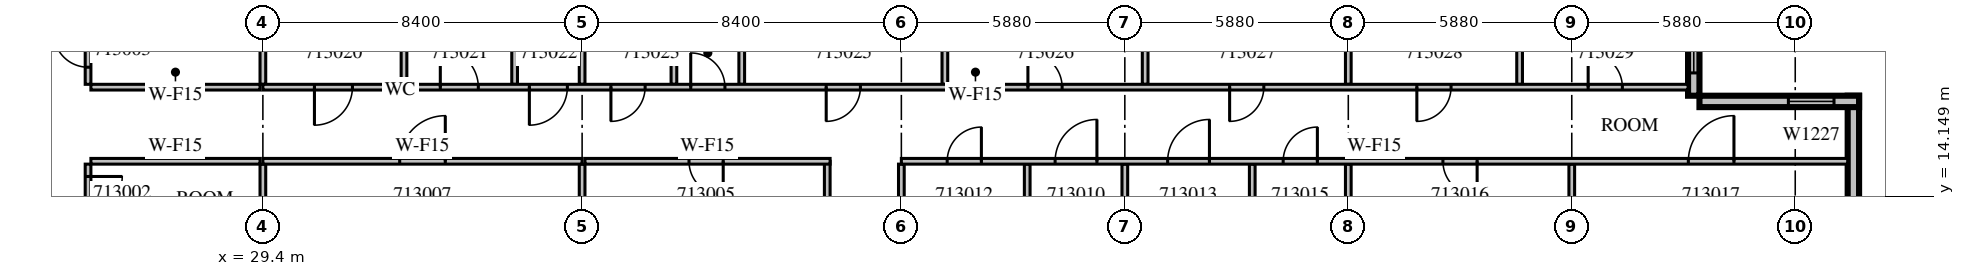
"""IFC4 building model, lengths in metres.
Left out: names, types, materials, properties, quantities, classifications, styles, units other than length and angle.
Written with IfcOpenShell. Run it as: python <this file> out.ifc"""

import sys

from ifc_helpers import new_model, si_unit, direction, frame, frame_2d, origin, place, context, subcontext, project, spatial, rectangle, extrude, source, transform, mapped, element, fill, save


model = new_model("IFC4")
c1 = context("Model", 3, precision=1e-05, world=origin(), true_north=direction((0.0, 1.0)))
c2 = subcontext(c1, "Body", "Model", "MODEL_VIEW")
j1 = project(units=[si_unit("LENGTHUNIT", "METRE"), si_unit("PLANEANGLEUNIT", "RADIAN")], contexts=[c1])
p1 = place(None, origin())
s1 = spatial("IfcSite", under=j1, at=p1, CompositionType="ELEMENT")
p2 = place(p1, origin())
s2 = spatial("IfcBuilding", under=s1, at=p2, CompositionType="ELEMENT")
p3 = place(p2, frame((0.0, 0.0, 65.7)))
s3 = spatial("IfcBuildingStorey", under=s2, at=p3, CompositionType="ELEMENT", Elevation=65.7)
m1 = source(origin(), c2, "Body", "SweptSolid", [
    extrude(rectangle(XDim=6.3, YDim=0.3, at=frame_2d((3.15, 0.0))), origin(), (0.0, 0.0, 1.0), 3.8),
])
p4 = place(p3, frame((71.25, 10.5, 0.0), z_axis=(0.0, 0.0, 1.0), x_axis=(0.0, 1.0, 0.0)))
e1 = element("IfcWall", 1, at=p4, inside=s3, PredefinedType="STANDARD", context=c2, shape_type="MappedRepresentation", body=[
    mapped(m1, transform((0.0, 0.0, 0.0), scale=1.0)),
])
m2 = source(origin(), c2, "Body", "SweptSolid", [
    extrude(rectangle(XDim=1.2, YDim=2.7, at=frame_2d((0.6, 1.35))), frame((0.0, 0.16, 0.0), z_axis=(0.0, -1.0, 0.0), x_axis=(1.0, 0.0, 0.0)), (0.0, 0.0, 1.0), 0.32),
])
p5 = place(p4, frame((1.062, 0.0, 0.6)))
e2 = element("IfcOpeningElement", 2, at=p5, cuts=e1, PredefinedType="OPENING", context=c2, shape_type="MappedRepresentation", body=[
    mapped(m2, transform((0.0, 0.0, 0.0), scale=1.0)),
])
m3 = source(origin(), c2, "Body", "SweptSolid", [
    extrude(rectangle(XDim=4.2, YDim=0.3, at=frame_2d((2.1, 0.0))), origin(), (0.0, 0.0, 1.0), 3.8),
])
p6 = place(p3, frame((71.4, 16.65, 0.0), z_axis=(0.0, 0.0, 1.0), x_axis=(-1.0, 0.0, 0.0)))
e3 = element("IfcWall", 3, at=p6, inside=s3, PredefinedType="STANDARD", context=c2, shape_type="MappedRepresentation", body=[
    mapped(m3, transform((0.0, 0.0, 0.0), scale=1.0)),
])
p7 = place(p6, frame((0.66, 0.0, 0.6)))
e4 = element("IfcOpeningElement", 4, at=p7, cuts=e3, PredefinedType="OPENING", context=c2, shape_type="MappedRepresentation", body=[
    mapped(m2, transform((0.0, 0.0, 0.0), scale=1.0)),
])
p8 = place(p3, frame((67.05, 16.8, 0.0), z_axis=(0.0, 0.0, 1.0), x_axis=(0.0, 1.0, 0.0)))
e5 = element("IfcWall", 5, at=p8, inside=s3, PredefinedType="STANDARD", context=c2, shape_type="MappedRepresentation", body=[
    mapped(m3, transform((0.0, 0.0, 0.0), scale=1.0)),
])
m4 = source(origin(), c2, "Body", "SweptSolid", [
    extrude(rectangle(XDim=3.0, YDim=2.7, at=frame_2d((1.5, 1.35))), frame((0.0, 0.16, 0.0), z_axis=(0.0, -1.0, 0.0), x_axis=(1.0, 0.0, 0.0)), (0.0, 0.0, 1.0), 0.32),
])
p9 = place(p8, frame((0.6, 0.0, 0.6)))
e6 = element("IfcOpeningElement", 6, at=p9, cuts=e5, PredefinedType="OPENING", context=c2, shape_type="MappedRepresentation", body=[
    mapped(m4, transform((0.0, 0.0, 0.0), scale=1.0)),
])
m5 = source(origin(), c2, "Body", "SweptSolid", [
    extrude(rectangle(XDim=11.925, YDim=0.15, at=frame_2d((5.963, 0.0))), origin(), (0.0, 0.0, 1.0), 3.8),
])
p10 = place(p3, frame((24.8, 15.0, 0.0), z_axis=(0.0, 0.0, 1.0), x_axis=(0.0, -1.0, 0.0)))
e7 = element("IfcWall", 7, at=p10, inside=s3, PredefinedType="PARTITIONING", context=c2, shape_type="MappedRepresentation", body=[
    mapped(m5, transform((0.0, 0.0, 0.0), scale=1.0)),
])
m6 = source(origin(), c2, "Body", "SweptSolid", [
    extrude(rectangle(XDim=0.9, YDim=2.1, at=frame_2d((0.45, 1.05))), frame((0.0, 0.085, 0.0), z_axis=(0.0, -1.0, 0.0), x_axis=(1.0, 0.0, 0.0)), (0.0, 0.0, 1.0), 0.17),
])
p11 = place(p10, frame((7.162, 0.0, 0.0)))
e8 = element("IfcOpeningElement", 8, at=p11, cuts=e7, PredefinedType="OPENING", context=c2, shape_type="MappedRepresentation", body=[
    mapped(m6, transform((0.0, 0.0, 0.0), scale=1.0)),
])
p12 = place(p10, frame((0.325, 0.0, 0.0)))
e9 = element("IfcOpeningElement", 9, at=p12, cuts=e7, PredefinedType="OPENING", context=c2, shape_type="MappedRepresentation", body=[
    mapped(m6, transform((0.0, 0.0, 0.0), scale=1.0)),
])
m7 = source(origin(), c2, "Body", "SweptSolid", [
    extrude(rectangle(XDim=3.6, YDim=0.15, at=frame_2d((1.8, 0.0))), origin(), (0.0, 0.0, 1.0), 3.8),
])
p13 = place(p3, frame((24.8, 20.7, 0.0), z_axis=(0.0, 0.0, 1.0), x_axis=(0.0, -1.0, 0.0)))
e10 = element("IfcWall", 10, at=p13, inside=s3, PredefinedType="PARTITIONING", context=c2, shape_type="MappedRepresentation", body=[
    mapped(m7, transform((0.0, 0.0, 0.0), scale=1.0)),
])
p14 = place(p13, frame((2.25, 0.0, 0.0)))
e11 = element("IfcOpeningElement", 11, at=p14, cuts=e10, PredefinedType="OPENING", context=c2, shape_type="MappedRepresentation", body=[
    mapped(m6, transform((0.0, 0.0, 0.0), scale=1.0)),
])
m8 = source(origin(), c2, "Body", "SweptSolid", [
    extrude(rectangle(XDim=4.45, YDim=0.15, at=frame_2d((2.225, 0.0))), origin(), (0.0, 0.0, 1.0), 3.8),
])
for number, where, z_axis, x_axis in (
    (12, (29.325, 15.075, 0.0), (0.0, 0.0, 1.0), (-1.0, 0.0, 0.0)),
    (13, (24.875, 17.025, 0.0), (0.0, 0.0, 1.0), (1.0, 0.0, 0.0)),
):
    element("IfcWall", number, at=place(p3, frame(where, z_axis=z_axis, x_axis=x_axis)), inside=s3, PredefinedType="PARTITIONING", context=c2, shape_type="MappedRepresentation", body=[
        mapped(m8, transform((0.0, 0.0, 0.0), scale=1.0)),
    ])
m9 = source(origin(), c2, "Body", "SweptSolid", [
    extrude(rectangle(XDim=3.901, YDim=0.15, at=frame_2d((1.95, 0.0))), origin(), (0.0, 0.0, 1.0), 3.8),
])
p15 = place(p3, frame((29.4, 11.099, 0.0), z_axis=(0.0, 0.0, 1.0), x_axis=(0.0, 1.0, 0.0)))
e14 = element("IfcWall", 14, at=p15, inside=s3, PredefinedType="PARTITIONING", context=c2, shape_type="MappedRepresentation", body=[
    mapped(m9, transform((0.0, 0.0, 0.0), scale=1.0)),
])
m10 = source(origin(), c2, "Body", "SweptSolid", [
    extrude(rectangle(XDim=2.701, YDim=0.15, at=frame_2d((1.351, 0.0))), origin(), (0.0, 0.0, 1.0), 3.8),
])
p16 = place(p3, frame((29.4, 17.1, 0.0), z_axis=(0.0, 0.0, 1.0), x_axis=(0.0, 1.0, 0.0)))
e15 = element("IfcWall", 15, at=p16, inside=s3, PredefinedType="PARTITIONING", context=c2, shape_type="MappedRepresentation", body=[
    mapped(m10, transform((0.0, 0.0, 0.0), scale=1.0)),
])
p17 = place(p3, frame((44.25, 12.3, 0.0), z_axis=(0.0, 0.0, 1.0), x_axis=(0.0, 1.0, 0.0)))
e16 = element("IfcWall", 16, at=p17, inside=s3, PredefinedType="PARTITIONING", context=c2, shape_type="SweptSolid", body=[
    extrude(rectangle(XDim=2.775, YDim=0.15, at=frame_2d((1.387, 0.0))), origin(), (0.0, 0.0, 1.0), 3.8),
])
m11 = source(origin(), c2, "Body", "SweptSolid", [
    extrude(rectangle(XDim=6.45, YDim=0.15, at=frame_2d((3.225, 0.0))), origin(), (0.0, 0.0, 1.0), 3.8),
])
p18 = place(p3, frame((44.325, 15.075, 0.0), z_axis=(0.0, 0.0, 1.0), x_axis=(-1.0, 0.0, 0.0)))
e17 = element("IfcWall", 17, at=p18, inside=s3, PredefinedType="PARTITIONING", context=c2, shape_type="MappedRepresentation", body=[
    mapped(m11, transform((0.0, 0.0, 0.0), scale=1.0)),
])
p19 = place(p18, frame((2.812, 0.0, 0.0)))
e18 = element("IfcOpeningElement", 18, at=p19, cuts=e17, PredefinedType="OPENING", context=c2, shape_type="MappedRepresentation", body=[
    mapped(m6, transform((0.0, 0.0, 0.0), scale=1.0)),
])
m12 = source(origin(), c2, "Body", "SweptSolid", [
    extrude(rectangle(XDim=3.75, YDim=0.15, at=frame_2d((1.875, 0.0))), origin(), (0.0, 0.0, 1.0), 3.8),
])
for number, where, z_axis, x_axis in (
    (19, (37.8, 11.25, 0.0), (0.0, 0.0, 1.0), (0.0, 1.0, 0.0)),
    (20, (49.512, 11.25, 0.0), (0.0, 0.0, 1.0), (0.0, 1.0, 0.0)),
    (21, (55.433, 11.25, 0.0), (0.0, 0.0, 1.0), (0.0, 1.0, 0.0)),
    (22, (57.96, 11.25, 0.0), (0.0, 0.0, 1.0), (0.0, 1.0, 0.0)),
    (23, (46.2, 11.25, 0.0), (0.0, 0.0, 1.0), (0.0, 1.0, 0.0)),
    (24, (52.08, 11.25, 0.0), (0.0, 0.0, 1.0), (0.0, 1.0, 0.0)),
    (25, (63.84, 11.25, 0.0), (0.0, 0.0, 1.0), (0.0, 1.0, 0.0)),
):
    element("IfcWall", number, at=place(p3, frame(where, z_axis=z_axis, x_axis=x_axis)), inside=s3, PredefinedType="PARTITIONING", context=c2, shape_type="MappedRepresentation", body=[
        mapped(m12, transform((0.0, 0.0, 0.0), scale=1.0)),
    ])
for number, where, z_axis, x_axis in (
    (26, (33.113, 20.7, 0.0), (0.0, 0.0, 1.0), (0.0, -1.0, 0.0)),
    (27, (36.024, 20.7, 0.0), (0.0, 0.0, 1.0), (0.0, -1.0, 0.0)),
    (28, (40.216, 20.7, 0.0), (0.0, 0.0, 1.0), (0.0, -1.0, 0.0)),
    (29, (47.345, 20.7, 0.0), (0.0, 0.0, 1.0), (0.0, -1.0, 0.0)),
):
    element("IfcWall", number, at=place(p3, frame(where, z_axis=z_axis, x_axis=x_axis)), inside=s3, PredefinedType="PARTITIONING", context=c2, shape_type="MappedRepresentation", body=[
        mapped(m7, transform((0.0, 0.0, 0.0), scale=1.0)),
    ])
p20 = place(p3, frame((52.615, 19.801, 0.0), z_axis=(0.0, 0.0, 1.0), x_axis=(0.0, -1.0, 0.0)))
e30 = element("IfcWall", 30, at=p20, inside=s3, PredefinedType="PARTITIONING", context=c2, shape_type="MappedRepresentation", body=[
    mapped(m10, transform((0.0, 0.0, 0.0), scale=1.0)),
])
p21 = place(p3, frame((62.468, 20.7, 0.0), z_axis=(0.0, 0.0, 1.0), x_axis=(0.0, -1.0, 0.0)))
e31 = element("IfcWall", 31, at=p21, inside=s3, PredefinedType="PARTITIONING", context=c2, shape_type="MappedRepresentation", body=[
    mapped(m7, transform((0.0, 0.0, 0.0), scale=1.0)),
])
p22 = place(p3, frame((37.8, 17.1, 0.0), z_axis=(0.0, 0.0, 1.0), x_axis=(0.0, 1.0, 0.0)))
e32 = element("IfcWall", 32, at=p22, inside=s3, PredefinedType="PARTITIONING", context=c2, shape_type="MappedRepresentation", body=[
    mapped(m10, transform((0.0, 0.0, 0.0), scale=1.0)),
])
p23 = place(p3, frame((42.0, 17.1, 0.0), z_axis=(0.0, 0.0, 1.0), x_axis=(0.0, 1.0, 0.0)))
e33 = element("IfcWall", 33, at=p23, inside=s3, PredefinedType="PARTITIONING", context=c2, shape_type="MappedRepresentation", body=[
    mapped(m7, transform((0.0, 0.0, 0.0), scale=1.0)),
])
p24 = place(p3, frame((57.96, 17.1, 0.0), z_axis=(0.0, 0.0, 1.0), x_axis=(0.0, 1.0, 0.0)))
e34 = element("IfcWall", 34, at=p24, inside=s3, PredefinedType="PARTITIONING", context=c2, shape_type="MappedRepresentation", body=[
    mapped(m10, transform((0.0, 0.0, 0.0), scale=1.0)),
])
m13 = source(origin(), c2, "Body", "SweptSolid", [
    extrude(rectangle(XDim=8.4, YDim=0.15, at=frame_2d((4.2, 0.0))), origin(), (0.0, 0.0, 1.0), 3.8),
])
p25 = place(p3, frame((37.8, 15.075, 0.0), z_axis=(0.0, 0.0, 1.0), x_axis=(-1.0, 0.0, 0.0)))
e35 = element("IfcWall", 35, at=p25, inside=s3, PredefinedType="PARTITIONING", context=c2, shape_type="MappedRepresentation", body=[
    mapped(m13, transform((0.0, 0.0, 0.0), scale=1.0)),
])
m14 = source(origin(), c2, "Body", "SweptSolid", [
    extrude(rectangle(XDim=1.2, YDim=2.1, at=frame_2d((0.6, 1.05))), frame((0.0, 0.085, 0.0), z_axis=(0.0, -1.0, 0.0), x_axis=(1.0, 0.0, 0.0)), (0.0, 0.0, 1.0), 0.17),
])
p26 = place(p25, frame((3.6, 0.0, 0.0)))
e36 = element("IfcOpeningElement", 36, at=p26, cuts=e35, PredefinedType="OPENING", context=c2, shape_type="MappedRepresentation", body=[
    mapped(m14, transform((0.0, 0.0, 0.0), scale=1.0)),
])
m15 = source(origin(), c2, "Body", "SweptSolid", [
    extrude(rectangle(XDim=24.9, YDim=0.15, at=frame_2d((12.45, 0.0))), origin(), (0.0, 0.0, 1.0), 3.8),
])
p27 = place(p3, frame((71.1, 15.075, 0.0), z_axis=(0.0, 0.0, 1.0), x_axis=(-1.0, 0.0, 0.0)))
e37 = element("IfcWall", 37, at=p27, inside=s3, PredefinedType="PARTITIONING", context=c2, shape_type="MappedRepresentation", body=[
    mapped(m15, transform((0.0, 0.0, 0.0), scale=1.0)),
])
m16 = source(origin(), c2, "Body", "SweptSolid", [
    extrude(rectangle(XDim=1.1, YDim=2.1, at=frame_2d((0.55, 1.05))), frame((0.0, 0.085, 0.0), z_axis=(0.0, -1.0, 0.0), x_axis=(1.0, 0.0, 0.0)), (0.0, 0.0, 1.0), 0.17),
])
p28 = place(p27, frame((19.754, 0.0, 0.0)))
e38 = element("IfcOpeningElement", 38, at=p28, cuts=e37, PredefinedType="OPENING", context=c2, shape_type="MappedRepresentation", body=[
    mapped(m16, transform((0.0, 0.0, 0.0), scale=1.0)),
])
p29 = place(p27, frame((22.794, 0.0, 0.0)))
e39 = element("IfcOpeningElement", 39, at=p29, cuts=e37, PredefinedType="OPENING", context=c2, shape_type="MappedRepresentation", body=[
    mapped(m6, transform((0.0, 0.0, 0.0), scale=1.0)),
])
p30 = place(p27, frame((16.794, 0.0, 0.0)))
e40 = element("IfcOpeningElement", 40, at=p30, cuts=e37, PredefinedType="OPENING", context=c2, shape_type="MappedRepresentation", body=[
    mapped(m16, transform((0.0, 0.0, 0.0), scale=1.0)),
])
p31 = place(p27, frame((13.954, 0.0, 0.0)))
e41 = element("IfcOpeningElement", 41, at=p31, cuts=e37, PredefinedType="OPENING", context=c2, shape_type="MappedRepresentation", body=[
    mapped(m6, transform((0.0, 0.0, 0.0), scale=1.0)),
])
p32 = place(p27, frame((9.75, 0.0, 0.0)))
e42 = element("IfcOpeningElement", 42, at=p32, cuts=e37, PredefinedType="OPENING", context=c2, shape_type="MappedRepresentation", body=[
    mapped(m6, transform((0.0, 0.0, 0.0), scale=1.0)),
])
p33 = place(p27, frame((2.993, 0.0, 0.0)))
e43 = element("IfcOpeningElement", 43, at=p33, cuts=e37, PredefinedType="OPENING", context=c2, shape_type="MappedRepresentation", body=[
    mapped(m14, transform((0.0, 0.0, 0.0), scale=1.0)),
])
m17 = source(origin(), c2, "Body", "SweptSolid", [
    extrude(rectangle(XDim=37.5, YDim=0.15, at=frame_2d((18.75, 0.0))), origin(), (0.0, 0.0, 1.0), 3.8),
])
p34 = place(p3, frame((29.4, 17.025, 0.0), z_axis=(0.0, 0.0, 1.0), x_axis=(1.0, 0.0, 0.0)))
e44 = element("IfcWall", 44, at=p34, inside=s3, PredefinedType="PARTITIONING", context=c2, shape_type="MappedRepresentation", body=[
    mapped(m17, transform((0.0, 0.0, 0.0), scale=1.0)),
])
m18 = source(origin(), c2, "Body", "SweptSolid", [
    extrude(rectangle(XDim=1.0, YDim=2.1, at=frame_2d((0.5, 1.05))), frame((0.0, 0.085, 0.0), z_axis=(0.0, -1.0, 0.0), x_axis=(1.0, 0.0, 0.0)), (0.0, 0.0, 1.0), 0.17),
])
p35 = place(p34, frame((1.357, 0.0, 0.0)))
e45 = element("IfcOpeningElement", 45, at=p35, cuts=e44, PredefinedType="OPENING", context=c2, shape_type="MappedRepresentation", body=[
    mapped(m18, transform((0.0, 0.0, 0.0), scale=1.0)),
])
p36 = place(p34, frame((4.669, 0.0, 0.0)))
e46 = element("IfcOpeningElement", 46, at=p36, cuts=e44, PredefinedType="OPENING", context=c2, shape_type="MappedRepresentation", body=[
    mapped(m18, transform((0.0, 0.0, 0.0), scale=1.0)),
])
p37 = place(p34, frame((7.012, 0.0, 0.0)))
e47 = element("IfcOpeningElement", 47, at=p37, cuts=e44, PredefinedType="OPENING", context=c2, shape_type="MappedRepresentation", body=[
    mapped(m18, transform((0.0, 0.0, 0.0), scale=1.0)),
])
p38 = place(p34, frame((9.158, 0.0, 0.0)))
e48 = element("IfcOpeningElement", 48, at=p38, cuts=e44, PredefinedType="OPENING", context=c2, shape_type="MappedRepresentation", body=[
    mapped(m6, transform((0.0, 0.0, 0.0), scale=1.0)),
])
p39 = place(p34, frame((11.258, 0.0, 0.0)))
e49 = element("IfcOpeningElement", 49, at=p39, cuts=e44, PredefinedType="OPENING", context=c2, shape_type="MappedRepresentation", body=[
    mapped(m6, transform((0.0, 0.0, 0.0), scale=1.0)),
])
p40 = place(p34, frame((14.822, 0.0, 0.0)))
e50 = element("IfcOpeningElement", 50, at=p40, cuts=e44, PredefinedType="OPENING", context=c2, shape_type="MappedRepresentation", body=[
    mapped(m6, transform((0.0, 0.0, 0.0), scale=1.0)),
])
p41 = place(p34, frame((20.13, 0.0, 0.0)))
e51 = element("IfcOpeningElement", 51, at=p41, cuts=e44, PredefinedType="OPENING", context=c2, shape_type="MappedRepresentation", body=[
    mapped(m6, transform((0.0, 0.0, 0.0), scale=1.0)),
])
p42 = place(p34, frame((25.438, 0.0, 0.0)))
e52 = element("IfcOpeningElement", 52, at=p42, cuts=e44, PredefinedType="OPENING", context=c2, shape_type="MappedRepresentation", body=[
    mapped(m6, transform((0.0, 0.0, 0.0), scale=1.0)),
])
p43 = place(p34, frame((30.364, 0.0, 0.0)))
e53 = element("IfcOpeningElement", 53, at=p43, cuts=e44, PredefinedType="OPENING", context=c2, shape_type="MappedRepresentation", body=[
    mapped(m6, transform((0.0, 0.0, 0.0), scale=1.0)),
])
p44 = place(p34, frame((34.871, 0.0, 0.0)))
e54 = element("IfcOpeningElement", 54, at=p44, cuts=e44, PredefinedType="OPENING", context=c2, shape_type="MappedRepresentation", body=[
    mapped(m6, transform((0.0, 0.0, 0.0), scale=1.0)),
])
m19 = source(origin(), c2, "Body", "SweptSolid", [
    extrude(rectangle(XDim=1.2, YDim=2.7, at=frame_2d((0.6, 1.35))), frame((0.0, 0.03, 0.0), z_axis=(0.0, -1.0, 0.0), x_axis=(1.0, 0.0, 0.0)), (0.0, 0.0, 1.0), 0.06),
])
p45 = place(p7, origin())
e55 = element("IfcWindow", 55, at=p45, inside=s3, PartitioningType="SINGLE_PANEL", PredefinedType="WINDOW", context=c2, shape_type="MappedRepresentation", body=[
    mapped(m19, transform((0.0, 0.0, 0.0), scale=1.0)),
])
fill(e4, e55)
m20 = source(origin(), c2, "Body", "SweptSolid", [
    extrude(rectangle(XDim=3.0, YDim=2.7, at=frame_2d((1.5, 1.35))), frame((0.0, 0.03, 0.0), z_axis=(0.0, -1.0, 0.0), x_axis=(1.0, 0.0, 0.0)), (0.0, 0.0, 1.0), 0.06),
])
p46 = place(p9, origin())
e56 = element("IfcWindow", 56, at=p46, inside=s3, PartitioningType="SINGLE_PANEL", PredefinedType="WINDOW", context=c2, shape_type="MappedRepresentation", body=[
    mapped(m20, transform((0.0, 0.0, 0.0), scale=1.0)),
])
fill(e6, e56)
m21 = source(origin(), c2, "Body", "SweptSolid", [
    extrude(rectangle(XDim=0.9, YDim=2.1, at=frame_2d((0.45, 1.05))), frame((0.0, 0.025, 0.0), z_axis=(0.0, -1.0, 0.0), x_axis=(1.0, 0.0, 0.0)), (0.0, 0.0, 1.0), 0.05),
])
p47 = place(p12, origin())
e57 = element("IfcDoor", 57, at=p47, inside=s3, OperationType="SINGLE_SWING_LEFT", PredefinedType="DOOR", context=c2, shape_type="MappedRepresentation", body=[
    mapped(m21, transform((0.0, 0.0, 0.0), scale=1.0)),
])
fill(e9, e57)
p48 = place(p14, origin())
e58 = element("IfcDoor", 58, at=p48, inside=s3, OperationType="SINGLE_SWING_RIGHT", PredefinedType="DOOR", context=c2, shape_type="MappedRepresentation", body=[
    mapped(m21, transform((0.0, 0.0, 0.0), scale=1.0)),
])
fill(e11, e58)
p49 = place(p19, origin())
e59 = element("IfcDoor", 59, at=p49, inside=s3, OperationType="SINGLE_SWING_LEFT", PredefinedType="DOOR", context=c2, shape_type="MappedRepresentation", body=[
    mapped(m21, transform((0.0, 0.0, 0.0), scale=1.0)),
])
fill(e18, e59)
m22 = source(origin(), c2, "Body", "SweptSolid", [
    extrude(rectangle(XDim=1.2, YDim=2.1, at=frame_2d((0.6, 1.05))), frame((0.0, 0.025, 0.0), z_axis=(0.0, -1.0, 0.0), x_axis=(1.0, 0.0, 0.0)), (0.0, 0.0, 1.0), 0.05),
])
p50 = place(p26, origin())
e60 = element("IfcDoor", 60, at=p50, inside=s3, OperationType="SINGLE_SWING_RIGHT", PredefinedType="DOOR", context=c2, shape_type="MappedRepresentation", body=[
    mapped(m22, transform((0.0, 0.0, 0.0), scale=1.0)),
])
fill(e36, e60)
m23 = source(origin(), c2, "Body", "SweptSolid", [
    extrude(rectangle(XDim=1.1, YDim=2.1, at=frame_2d((0.55, 1.05))), frame((0.0, 0.025, 0.0), z_axis=(0.0, -1.0, 0.0), x_axis=(1.0, 0.0, 0.0)), (0.0, 0.0, 1.0), 0.05),
])
p51 = place(p28, origin())
e61 = element("IfcDoor", 61, at=p51, inside=s3, OperationType="SINGLE_SWING_RIGHT", PredefinedType="DOOR", context=c2, shape_type="MappedRepresentation", body=[
    mapped(m23, transform((0.0, 0.0, 0.0), scale=1.0)),
])
fill(e38, e61)
p52 = place(p29, origin())
e62 = element("IfcDoor", 62, at=p52, inside=s3, OperationType="SINGLE_SWING_RIGHT", PredefinedType="DOOR", context=c2, shape_type="MappedRepresentation", body=[
    mapped(m21, transform((0.0, 0.0, 0.0), scale=1.0)),
])
fill(e39, e62)
p53 = place(p30, origin())
e63 = element("IfcDoor", 63, at=p53, inside=s3, OperationType="SINGLE_SWING_RIGHT", PredefinedType="DOOR", context=c2, shape_type="MappedRepresentation", body=[
    mapped(m23, transform((0.0, 0.0, 0.0), scale=1.0)),
])
fill(e40, e63)
p54 = place(p31, origin())
e64 = element("IfcDoor", 64, at=p54, inside=s3, OperationType="SINGLE_SWING_RIGHT", PredefinedType="DOOR", context=c2, shape_type="MappedRepresentation", body=[
    mapped(m21, transform((0.0, 0.0, 0.0), scale=1.0)),
])
fill(e41, e64)
p55 = place(p32, origin())
e65 = element("IfcDoor", 65, at=p55, inside=s3, OperationType="SINGLE_SWING_LEFT", PredefinedType="DOOR", context=c2, shape_type="MappedRepresentation", body=[
    mapped(m21, transform((0.0, 0.0, 0.0), scale=1.0)),
])
fill(e42, e65)
p56 = place(p33, origin())
e66 = element("IfcDoor", 66, at=p56, inside=s3, OperationType="SINGLE_SWING_RIGHT", PredefinedType="DOOR", context=c2, shape_type="MappedRepresentation", body=[
    mapped(m22, transform((0.0, 0.0, 0.0), scale=1.0)),
])
fill(e43, e66)
m24 = source(origin(), c2, "Body", "SweptSolid", [
    extrude(rectangle(XDim=1.0, YDim=2.1, at=frame_2d((0.5, 1.05))), frame((0.0, 0.025, 0.0), z_axis=(0.0, -1.0, 0.0), x_axis=(1.0, 0.0, 0.0)), (0.0, 0.0, 1.0), 0.05),
])
p57 = place(p35, origin())
e67 = element("IfcDoor", 67, at=p57, inside=s3, OperationType="SINGLE_SWING_RIGHT", PredefinedType="DOOR", context=c2, shape_type="MappedRepresentation", body=[
    mapped(m24, transform((0.0, 0.0, 0.0), scale=1.0)),
])
fill(e45, e67)
p58 = place(p36, origin())
e68 = element("IfcDoor", 68, at=p58, inside=s3, OperationType="SINGLE_SWING_LEFT", PredefinedType="DOOR", context=c2, shape_type="MappedRepresentation", body=[
    mapped(m24, transform((0.0, 0.0, 0.0), scale=1.0)),
])
fill(e46, e68)
p59 = place(p37, origin())
e69 = element("IfcDoor", 69, at=p59, inside=s3, OperationType="SINGLE_SWING_RIGHT", PredefinedType="DOOR", context=c2, shape_type="MappedRepresentation", body=[
    mapped(m24, transform((0.0, 0.0, 0.0), scale=1.0)),
])
fill(e47, e69)
p60 = place(p38, origin())
e70 = element("IfcDoor", 70, at=p60, inside=s3, OperationType="SINGLE_SWING_RIGHT", PredefinedType="DOOR", context=c2, shape_type="MappedRepresentation", body=[
    mapped(m21, transform((0.0, 0.0, 0.0), scale=1.0)),
])
fill(e48, e70)
p61 = place(p39, origin())
e71 = element("IfcDoor", 71, at=p61, inside=s3, OperationType="SINGLE_SWING_LEFT", PredefinedType="DOOR", context=c2, shape_type="MappedRepresentation", body=[
    mapped(m21, transform((0.0, 0.0, 0.0), scale=1.0)),
])
fill(e49, e71)
p62 = place(p40, origin())
e72 = element("IfcDoor", 72, at=p62, inside=s3, OperationType="SINGLE_SWING_RIGHT", PredefinedType="DOOR", context=c2, shape_type="MappedRepresentation", body=[
    mapped(m21, transform((0.0, 0.0, 0.0), scale=1.0)),
])
fill(e50, e72)
p63 = place(p41, origin())
e73 = element("IfcDoor", 73, at=p63, inside=s3, OperationType="SINGLE_SWING_LEFT", PredefinedType="DOOR", context=c2, shape_type="MappedRepresentation", body=[
    mapped(m21, transform((0.0, 0.0, 0.0), scale=1.0)),
])
fill(e51, e73)
p64 = place(p42, origin())
e74 = element("IfcDoor", 74, at=p64, inside=s3, OperationType="SINGLE_SWING_RIGHT", PredefinedType="DOOR", context=c2, shape_type="MappedRepresentation", body=[
    mapped(m21, transform((0.0, 0.0, 0.0), scale=1.0)),
])
fill(e52, e74)
p65 = place(p43, origin())
e75 = element("IfcDoor", 75, at=p65, inside=s3, OperationType="SINGLE_SWING_RIGHT", PredefinedType="DOOR", context=c2, shape_type="MappedRepresentation", body=[
    mapped(m21, transform((0.0, 0.0, 0.0), scale=1.0)),
])
fill(e53, e75)
p66 = place(p44, origin())
e76 = element("IfcDoor", 76, at=p66, inside=s3, OperationType="SINGLE_SWING_LEFT", PredefinedType="DOOR", context=c2, shape_type="MappedRepresentation", body=[
    mapped(m21, transform((0.0, 0.0, 0.0), scale=1.0)),
])
fill(e54, e76)
save(model, sys.argv[1])
